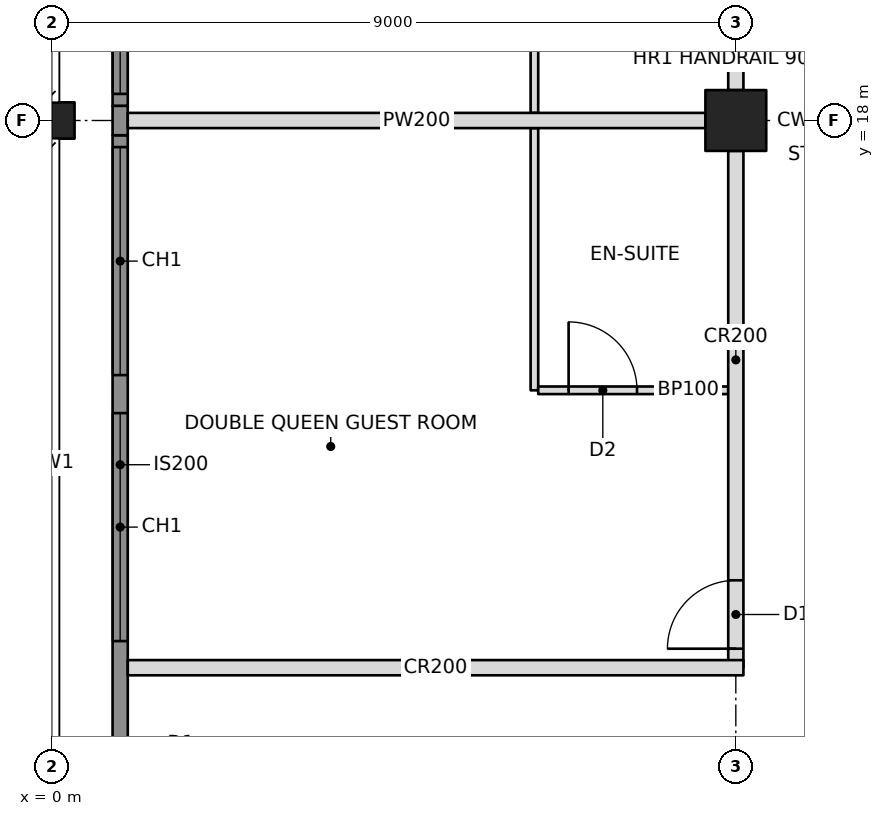
"""IFC4 building model, lengths in metres.
Left out: names, types, materials, properties, quantities, classifications, styles, units other than length and angle.
Written with IfcOpenShell. Run it as: python <this file> out.ifc"""

import sys

from ifc_helpers import new_model, si_unit, direction, frame, frame_2d, origin, origin_2d, place, context, subcontext, project, spatial, rectangle, hollow_rectangle, i_section, extrude, element, fill, save


model = new_model("IFC4")
c1 = context("Model", 3, precision=1e-05, world=origin(), true_north=direction((0.0, 1.0)))
c2 = subcontext(c1, "Body", "Model", "MODEL_VIEW")
j1 = project(units=[si_unit("LENGTHUNIT", "METRE"), si_unit("PLANEANGLEUNIT", "RADIAN")], contexts=[c1])
p1 = place(None, origin())
s1 = spatial("IfcSite", under=j1, at=p1, CompositionType="ELEMENT")
p2 = place(p1, origin())
s2 = spatial("IfcBuilding", under=s1, at=p2, CompositionType="ELEMENT")
p3 = place(p2, frame((0.0, 0.0, 28.0)))
s3 = spatial("IfcBuildingStorey", under=s2, at=p3, CompositionType="ELEMENT", Elevation=28.0)
p4 = place(p3, frame((0.0, 18.0, 0.0), z_axis=(0.0, 0.0, 1.0), x_axis=(0.0, 1.0, 0.0)))
e1 = element("IfcColumn", 1, at=p4, inside=s3, PredefinedType="COLUMN", context=c2, shape_type="SweptSolid", body=[
    extrude(i_section(OverallWidth=0.478, OverallDepth=0.599, WebThickness=0.1, FlangeThickness=0.14, at=origin_2d()), origin(), (0.0, 0.0, 1.0), 3.4),
])
p5 = place(p3, frame((9.0, 18.0, 0.0), z_axis=(0.0, 0.0, 1.0), x_axis=(1.0, 0.0, 0.0)))
e2 = element("IfcColumn", 2, at=p5, inside=s3, PredefinedType="COLUMN", context=c2, shape_type="SweptSolid", body=[
    extrude(hollow_rectangle(XDim=0.8, YDim=0.8, WallThickness=0.1, at=origin_2d()), origin(), (0.0, 0.0, 1.0), 3.4),
])
p6 = place(p3, frame((9.0, 10.8, 0.0), z_axis=(0.0, 0.0, 1.0), x_axis=(0.0, 1.0, 0.0)))
e3 = element("IfcWall", 3, at=p6, inside=s3, PredefinedType="PARTITIONING", context=c2, shape_type="SweptSolid", body=[
    extrude(rectangle(XDim=6.8, YDim=0.2, at=frame_2d((3.4, 0.0))), origin(), (0.0, 0.0, 1.0), 2.405),
])
p7 = place(p6, frame((0.25, 0.0, 0.0)))
e4 = element("IfcOpeningElement", 4, at=p7, cuts=e3, PredefinedType="OPENING", context=c2, shape_type="SweptSolid", body=[
    extrude(rectangle(XDim=0.9, YDim=2.1, at=frame_2d((0.45, 1.05))), frame((0.0, 0.11, 0.0), z_axis=(0.0, -1.0, 0.0), x_axis=(1.0, 0.0, 0.0)), (0.0, 0.0, 1.0), 0.22),
])
p8 = place(p3, frame((9.0, 18.4, 0.0), z_axis=(0.0, 0.0, 1.0), x_axis=(0.0, 1.0, 0.0)))
e5 = element("IfcWall", 5, at=p8, inside=s3, PredefinedType="PARTITIONING", context=c2, shape_type="SweptSolid", body=[
    extrude(rectangle(XDim=6.8, YDim=0.2, at=frame_2d((3.4, 0.0))), origin(), (0.0, 0.0, 1.0), 2.405),
])
p9 = place(p8, frame((5.65, 0.0, 0.0)))
e6 = element("IfcOpeningElement", 6, at=p9, cuts=e5, PredefinedType="OPENING", context=c2, shape_type="SweptSolid", body=[
    extrude(rectangle(XDim=0.9, YDim=2.1, at=frame_2d((0.45, 1.05))), frame((0.0, 0.11, 0.0), z_axis=(0.0, -1.0, 0.0), x_axis=(1.0, 0.0, 0.0)), (0.0, 0.0, 1.0), 0.22),
])
p10 = place(p3, frame((1.0, 10.8, 0.0), z_axis=(0.0, 0.0, 1.0), x_axis=(1.0, 0.0, 0.0)))
e7 = element("IfcWall", 7, at=p10, inside=s3, PredefinedType="PARTITIONING", context=c2, shape_type="SweptSolid", body=[
    extrude(rectangle(XDim=8.1, YDim=0.2, at=frame_2d((4.05, 0.0))), origin(), (0.0, 0.0, 1.0), 2.404),
])
p11 = place(p3, frame((8.6, 18.0, 0.0), z_axis=(0.0, 0.0, 1.0), x_axis=(-1.0, 0.0, 0.0)))
e8 = element("IfcWall", 8, at=p11, inside=s3, PredefinedType="PARTITIONING", context=c2, shape_type="SweptSolid", body=[
    extrude(rectangle(XDim=7.6, YDim=0.2, at=frame_2d((3.8, 0.0))), origin(), (0.0, 0.0, 1.0), 2.405),
])
p12 = place(p3, frame((6.35, 14.45, 0.0), z_axis=(0.0, 0.0, 1.0), x_axis=(0.0, 1.0, 0.0)))
e9 = element("IfcWall", 9, at=p12, inside=s3, PredefinedType="PARTITIONING", context=c2, shape_type="SweptSolid", body=[
    extrude(rectangle(XDim=3.45, YDim=0.1, at=frame_2d((1.725, 0.0))), origin(), (0.0, 0.0, 1.0), 2.404),
])
p13 = place(p3, frame((8.9, 14.45, 0.0), z_axis=(0.0, 0.0, 1.0), x_axis=(-1.0, 0.0, 0.0)))
e10 = element("IfcWall", 10, at=p13, inside=s3, PredefinedType="PARTITIONING", context=c2, shape_type="SweptSolid", body=[
    extrude(rectangle(XDim=2.5, YDim=0.1, at=frame_2d((1.25, 0.0))), origin(), (0.0, 0.0, 1.0), 2.404),
])
p14 = place(p13, frame((1.2, 0.0, 0.0)))
e11 = element("IfcOpeningElement", 11, at=p14, cuts=e10, PredefinedType="OPENING", context=c2, shape_type="SweptSolid", body=[
    extrude(rectangle(XDim=0.9, YDim=2.1, at=frame_2d((0.45, 1.05))), frame((0.0, 0.06, 0.0), z_axis=(0.0, -1.0, 0.0), x_axis=(1.0, 0.0, 0.0)), (0.0, 0.0, 1.0), 0.12),
])
p15 = place(p3, frame((6.35, 18.1, 0.0), z_axis=(0.0, 0.0, 1.0), x_axis=(0.0, 1.0, 0.0)))
e12 = element("IfcWall", 12, at=p15, inside=s3, PredefinedType="PARTITIONING", context=c2, shape_type="SweptSolid", body=[
    extrude(rectangle(XDim=3.45, YDim=0.1, at=frame_2d((1.725, 0.0))), origin(), (0.0, 0.0, 1.0), 2.404),
])
p16 = place(p3, frame((0.9, 9.135, 0.0), z_axis=(0.0, 0.0, 1.0), x_axis=(0.0, 1.0, 0.0)))
e13 = element("IfcWall", 13, at=p16, inside=s3, PredefinedType="SOLIDWALL", context=c2, shape_type="SweptSolid", body=[
    extrude(rectangle(XDim=8.671, YDim=0.2, at=frame_2d((4.335, 0.0))), origin(), (0.0, 0.0, 1.0), 3.2),
])
p17 = place(p16, frame((2.015, 0.0, 0.6)))
e14 = element("IfcOpeningElement", 14, at=p17, cuts=e13, PredefinedType="OPENING", context=c2, shape_type="SweptSolid", body=[
    extrude(rectangle(XDim=3.0, YDim=2.2, at=frame_2d((1.5, 1.1))), frame((0.0, 0.11, 0.0), z_axis=(0.0, -1.0, 0.0), x_axis=(1.0, 0.0, 0.0)), (0.0, 0.0, 1.0), 0.22),
])
p18 = place(p16, frame((5.515, 0.0, 0.6)))
e15 = element("IfcOpeningElement", 15, at=p18, cuts=e13, PredefinedType="OPENING", context=c2, shape_type="SweptSolid", body=[
    extrude(rectangle(XDim=3.0, YDim=2.2, at=frame_2d((1.5, 1.1))), frame((0.0, 0.11, 0.0), z_axis=(0.0, -1.0, 0.0), x_axis=(1.0, 0.0, 0.0)), (0.0, 0.0, 1.0), 0.22),
])
p19 = place(p3, frame((0.9, 17.806, 0.0), z_axis=(0.0, 0.0, 1.0), x_axis=(0.0, 1.0, 0.0)))
e16 = element("IfcWall", 16, at=p19, inside=s3, PredefinedType="SOLIDWALL", context=c2, shape_type="SweptSolid", body=[
    extrude(rectangle(XDim=0.388, YDim=0.2, at=frame_2d((0.194, 0.0))), origin(), (0.0, 0.0, 1.0), 2.404),
])
p20 = place(p3, frame((0.9, 18.194, 0.0), z_axis=(0.0, 0.0, 1.0), x_axis=(0.0, 1.0, 0.0)))
e17 = element("IfcWall", 17, at=p20, inside=s3, PredefinedType="SOLIDWALL", context=c2, shape_type="SweptSolid", body=[
    extrude(rectangle(XDim=8.671, YDim=0.2, at=frame_2d((4.335, 0.0))), origin(), (0.0, 0.0, 1.0), 3.2),
])
p21 = place(p20, frame((0.156, 0.0, 0.6)))
e18 = element("IfcOpeningElement", 18, at=p21, cuts=e17, PredefinedType="OPENING", context=c2, shape_type="SweptSolid", body=[
    extrude(rectangle(XDim=3.0, YDim=2.2, at=frame_2d((1.5, 1.1))), frame((0.0, 0.11, 0.0), z_axis=(0.0, -1.0, 0.0), x_axis=(1.0, 0.0, 0.0)), (0.0, 0.0, 1.0), 0.22),
])
p22 = place(p20, frame((3.656, 0.0, 0.6)))
e19 = element("IfcOpeningElement", 19, at=p22, cuts=e17, PredefinedType="OPENING", context=c2, shape_type="SweptSolid", body=[
    extrude(rectangle(XDim=3.0, YDim=2.2, at=frame_2d((1.5, 1.1))), frame((0.0, 0.11, 0.0), z_axis=(0.0, -1.0, 0.0), x_axis=(1.0, 0.0, 0.0)), (0.0, 0.0, 1.0), 0.22),
])
p23 = place(p17, origin())
e20 = element("IfcWindow", 20, at=p23, inside=s3, PartitioningType="TRIPLE_PANEL_VERTICAL", PredefinedType="WINDOW", context=c2, shape_type="SweptSolid", body=[
    extrude(rectangle(XDim=3.0, YDim=2.2, at=frame_2d((1.5, 1.1))), frame((0.0, 0.03, 0.0), z_axis=(0.0, -1.0, 0.0), x_axis=(1.0, 0.0, 0.0)), (0.0, 0.0, 1.0), 0.06),
])
fill(e14, e20)
p24 = place(p18, origin())
e21 = element("IfcWindow", 21, at=p24, inside=s3, PartitioningType="TRIPLE_PANEL_VERTICAL", PredefinedType="WINDOW", context=c2, shape_type="SweptSolid", body=[
    extrude(rectangle(XDim=3.0, YDim=2.2, at=frame_2d((1.5, 1.1))), frame((0.0, 0.03, 0.0), z_axis=(0.0, -1.0, 0.0), x_axis=(1.0, 0.0, 0.0)), (0.0, 0.0, 1.0), 0.06),
])
fill(e15, e21)
p25 = place(p21, origin())
e22 = element("IfcWindow", 22, at=p25, inside=s3, PartitioningType="TRIPLE_PANEL_VERTICAL", PredefinedType="WINDOW", context=c2, shape_type="SweptSolid", body=[
    extrude(rectangle(XDim=3.0, YDim=2.2, at=frame_2d((1.5, 1.1))), frame((0.0, 0.03, 0.0), z_axis=(0.0, -1.0, 0.0), x_axis=(1.0, 0.0, 0.0)), (0.0, 0.0, 1.0), 0.06),
])
fill(e18, e22)
p26 = place(p14, frame((0.9, 0.0, 0.0), z_axis=(0.0, 0.0, 1.0), x_axis=(-1.0, 0.0, 0.0)))
e23 = element("IfcDoor", 23, at=p26, inside=s3, OperationType="SINGLE_SWING_LEFT", PredefinedType="DOOR", context=c2, shape_type="SweptSolid", body=[
    extrude(rectangle(XDim=0.9, YDim=2.1, at=frame_2d((0.45, 1.05))), frame((0.0, 0.025, 0.0), z_axis=(0.0, -1.0, 0.0), x_axis=(1.0, 0.0, 0.0)), (0.0, 0.0, 1.0), 0.05),
])
fill(e11, e23)
p27 = place(p7, origin())
e24 = element("IfcDoor", 24, at=p27, inside=s3, OperationType="SINGLE_SWING_LEFT", PredefinedType="DOOR", context=c2, shape_type="SweptSolid", body=[
    extrude(rectangle(XDim=0.9, YDim=2.1, at=frame_2d((0.45, 1.05))), frame((0.0, 0.025, 0.0), z_axis=(0.0, -1.0, 0.0), x_axis=(1.0, 0.0, 0.0)), (0.0, 0.0, 1.0), 0.05),
])
fill(e4, e24)
save(model, sys.argv[1])
